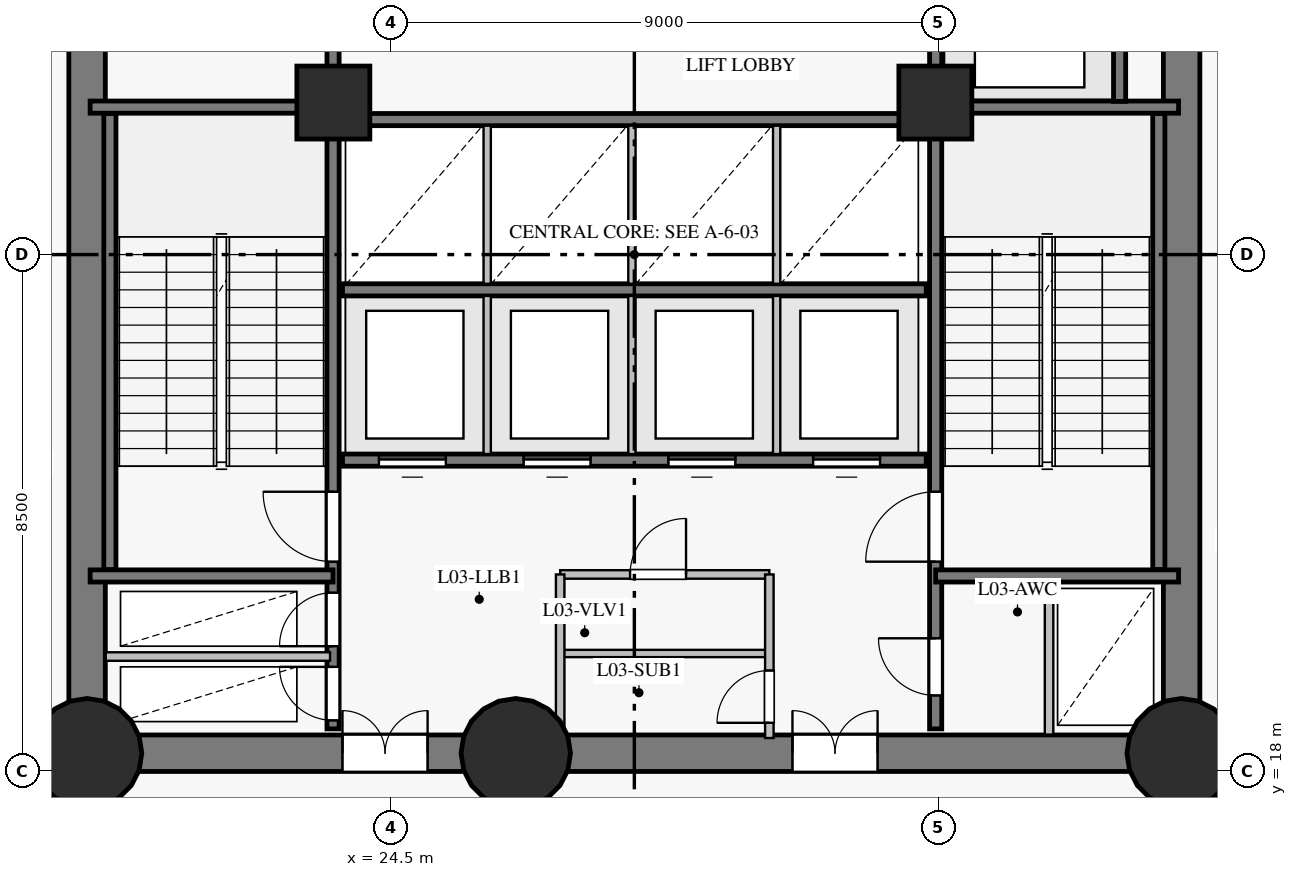
"""IFC4 building model, lengths in metres.
Left out: names, types, materials, properties, quantities, classifications, styles, units other than length and angle.
Written with IfcOpenShell. Run it as: python <this file> out.ifc"""

import sys

from ifc_helpers import new_model, si_unit, direction, frame, frame_2d, origin, origin_with_axes, origin_2d, place, context, subcontext, project, spatial, rectangle, circle, extrude, source, transform, mapped, element, fill, save


model = new_model("IFC4")
c1 = context("Model", 3, precision=1e-05, world=origin(), true_north=direction((0.0, 1.0)))
c2 = subcontext(c1, "Body", "Model", "MODEL_VIEW")
j1 = project(units=[si_unit("LENGTHUNIT", "METRE"), si_unit("PLANEANGLEUNIT", "RADIAN")], contexts=[c1])
p1 = place(None, origin())
s1 = spatial("IfcSite", under=j1, at=p1, CompositionType="ELEMENT")
p2 = place(p1, origin())
s2 = spatial("IfcBuilding", under=s1, at=p2, CompositionType="ELEMENT")
p3 = place(p2, frame((0.0, 0.0, 13.5)))
s3 = spatial("IfcBuildingStorey", under=s2, at=p3, CompositionType="ELEMENT", Elevation=13.5)
p4 = place(p3, frame((19.5, 18.3, 0.0), z_axis=(0.0, 0.0, 1.0), x_axis=(1.0, 0.0, 0.0)))
e1 = element("IfcWall", 1, at=p4, inside=s3, PredefinedType="SHEAR", context=c2, shape_type="SweptSolid", body=[
    extrude(rectangle(XDim=7.05, YDim=0.6, at=frame_2d((3.525, 0.0))), origin(), (0.0, 0.0, 1.0), 4.225),
])
p5 = place(p4, frame((4.2, 0.0, 0.0)))
e2 = element("IfcOpeningElement", 2, at=p5, cuts=e1, PredefinedType="OPENING", context=c2, shape_type="SweptSolid", body=[
    extrude(rectangle(XDim=1.4, YDim=2.2, at=frame_2d((0.7, 1.1))), frame((0.0, 0.31, 0.0), z_axis=(0.0, -1.0, 0.0), x_axis=(1.0, 0.0, 0.0)), (0.0, 0.0, 1.0), 0.62),
])
p6 = place(p3, frame((26.55, 18.3, 0.0), z_axis=(0.0, 0.0, 1.0), x_axis=(1.0, 0.0, 0.0)))
e3 = element("IfcWall", 3, at=p6, inside=s3, PredefinedType="SHEAR", context=c2, shape_type="SweptSolid", body=[
    extrude(rectangle(XDim=10.95, YDim=0.6, at=frame_2d((5.475, 0.0))), origin(), (0.0, 0.0, 1.0), 4.225),
])
p7 = place(p6, frame((4.55, 0.0, 0.0)))
e4 = element("IfcOpeningElement", 4, at=p7, cuts=e3, PredefinedType="OPENING", context=c2, shape_type="SweptSolid", body=[
    extrude(rectangle(XDim=1.4, YDim=2.2, at=frame_2d((0.7, 1.1))), frame((0.0, 0.31, 0.0), z_axis=(0.0, -1.0, 0.0), x_axis=(1.0, 0.0, 0.0)), (0.0, 0.0, 1.0), 0.62),
])
p8 = place(p3, frame((37.5, 18.3, 0.0), z_axis=(0.0, 0.0, 1.0), x_axis=(0.0, 1.0, 0.0)))
e5 = element("IfcWall", 5, at=p8, inside=s3, PredefinedType="SHEAR", context=c2, shape_type="SweptSolid", body=[
    extrude(rectangle(XDim=16.4, YDim=0.6, at=frame_2d((8.2, 0.0))), origin(), (0.0, 0.0, 1.0), 4.225),
])
p9 = place(p8, frame((13.96, 0.0, 0.0)))
e6 = element("IfcOpeningElement", 6, at=p9, cuts=e5, PredefinedType="OPENING", context=c2, shape_type="SweptSolid", body=[
    extrude(rectangle(XDim=1.2, YDim=2.15, at=frame_2d((0.6, 1.075))), frame((0.0, 0.31, 0.0), z_axis=(0.0, -1.0, 0.0), x_axis=(1.0, 0.0, 0.0)), (0.0, 0.0, 1.0), 0.62),
])
p10 = place(p3, frame((19.5, 34.7, 0.0), z_axis=(0.0, 0.0, 1.0), x_axis=(0.0, -1.0, 0.0)))
e7 = element("IfcWall", 7, at=p10, inside=s3, PredefinedType="SHEAR", context=c2, shape_type="SweptSolid", body=[
    extrude(rectangle(XDim=16.4, YDim=0.6, at=frame_2d((8.2, 0.0))), origin(), (0.0, 0.0, 1.0), 4.225),
])
p11 = place(p10, frame((3.1, 0.0, 0.0)))
e8 = element("IfcOpeningElement", 8, at=p11, cuts=e7, PredefinedType="OPENING", context=c2, shape_type="SweptSolid", body=[
    extrude(rectangle(XDim=1.1, YDim=2.15, at=frame_2d((0.55, 1.075))), frame((0.0, 0.31, 0.0), z_axis=(0.0, -1.0, 0.0), x_axis=(1.0, 0.0, 0.0)), (0.0, 0.0, 1.0), 0.62),
])
m1 = source(origin_with_axes(), c2, "Body", "SweptSolid", [
    extrude(circle(Radius=0.9, at=origin_2d()), origin(), (0.0, 0.0, 1.0), 4.5),
])
for number, where, z_axis, x_axis in (
    (9, (19.5, 18.3, 0.0), (0.0, 0.0, 1.0), (1.0, 0.0, 0.0)),
    (10, (26.55, 18.3, 0.0), (0.0, 0.0, 1.0), (1.0, 0.0, 0.0)),
    (11, (37.5, 18.3, 0.0), (0.0, 0.0, 1.0), (1.0, 0.0, 0.0)),
):
    element("IfcColumn", number, at=place(p3, frame(where, z_axis=z_axis, x_axis=x_axis)), inside=s3, PredefinedType="COLUMN", context=c2, shape_type="MappedRepresentation", body=[
        mapped(m1, transform((0.0, 0.0, 0.0), scale=1.0)),
    ])
m2 = source(origin_with_axes(), c2, "Body", "SweptSolid", [
    extrude(rectangle(XDim=1.2, YDim=1.2, at=origin_2d()), origin(), (0.0, 0.0, 1.0), 4.5),
])
for number, where, z_axis, x_axis in (
    (12, (23.55, 29.0, 0.0), (0.0, 0.0, 1.0), (1.0, 0.0, 0.0)),
    (13, (33.45, 29.0, 0.0), (0.0, 0.0, 1.0), (1.0, 0.0, 0.0)),
):
    element("IfcColumn", number, at=place(p3, frame(where, z_axis=z_axis, x_axis=x_axis)), inside=s3, PredefinedType="COLUMN", context=c2, shape_type="MappedRepresentation", body=[
        mapped(m2, transform((0.0, 0.0, 0.0), scale=1.0)),
    ])
p12 = place(p3, frame((23.545, 18.7, 0.0), z_axis=(0.0, 0.0, 1.0), x_axis=(0.0, 1.0, 0.0)))
e14 = element("IfcWall", 14, at=p12, inside=s3, PredefinedType="SHEAR", context=c2, shape_type="SweptSolid", body=[
    extrude(rectangle(XDim=15.6, YDim=0.2, at=frame_2d((7.8, 0.0))), origin(), (0.0, 0.0, 1.0), 4.225),
])
p13 = place(p12, frame((2.75, 0.0, 0.0)))
e15 = element("IfcOpeningElement", 15, at=p13, cuts=e14, PredefinedType="OPENING", context=c2, shape_type="SweptSolid", body=[
    extrude(rectangle(XDim=1.15, YDim=2.15, at=frame_2d((0.575, 1.075))), frame((0.0, 0.11, 0.0), z_axis=(0.0, -1.0, 0.0), x_axis=(1.0, 0.0, 0.0)), (0.0, 0.0, 1.0), 0.22),
])
p14 = place(p12, frame((0.14, 0.0, 0.0)))
e16 = element("IfcOpeningElement", 16, at=p14, cuts=e14, PredefinedType="OPENING", context=c2, shape_type="SweptSolid", body=[
    extrude(rectangle(XDim=0.88, YDim=2.1, at=frame_2d((0.44, 1.05))), frame((0.0, 0.11, 0.0), z_axis=(0.0, -1.0, 0.0), x_axis=(1.0, 0.0, 0.0)), (0.0, 0.0, 1.0), 0.22),
])
p15 = place(p12, frame((1.36, 0.0, 0.0)))
e17 = element("IfcOpeningElement", 17, at=p15, cuts=e14, PredefinedType="OPENING", context=c2, shape_type="SweptSolid", body=[
    extrude(rectangle(XDim=0.88, YDim=2.1, at=frame_2d((0.44, 1.05))), frame((0.0, 0.11, 0.0), z_axis=(0.0, -1.0, 0.0), x_axis=(1.0, 0.0, 0.0)), (0.0, 0.0, 1.0), 0.22),
])
p16 = place(p12, frame((12.1, 0.0, 0.0)))
e18 = element("IfcOpeningElement", 18, at=p16, cuts=e14, PredefinedType="OPENING", context=c2, shape_type="SweptSolid", body=[
    extrude(rectangle(XDim=1.12, YDim=2.15, at=frame_2d((0.56, 1.075))), frame((0.0, 0.11, 0.0), z_axis=(0.0, -1.0, 0.0), x_axis=(1.0, 0.0, 0.0)), (0.0, 0.0, 1.0), 0.22),
])
p17 = place(p12, frame((14.05, 0.0, 0.0)))
e19 = element("IfcOpeningElement", 19, at=p17, cuts=e14, PredefinedType="OPENING", context=c2, shape_type="SweptSolid", body=[
    extrude(rectangle(XDim=1.12, YDim=2.15, at=frame_2d((0.56, 1.075))), frame((0.0, 0.11, 0.0), z_axis=(0.0, -1.0, 0.0), x_axis=(1.0, 0.0, 0.0)), (0.0, 0.0, 1.0), 0.22),
])
p18 = place(p3, frame((33.455, 18.7, 0.0), z_axis=(0.0, 0.0, 1.0), x_axis=(0.0, 1.0, 0.0)))
e20 = element("IfcWall", 20, at=p18, inside=s3, PredefinedType="SHEAR", context=c2, shape_type="SweptSolid", body=[
    extrude(rectangle(XDim=15.6, YDim=0.2, at=frame_2d((7.8, 0.0))), origin(), (0.0, 0.0, 1.0), 4.225),
])
p19 = place(p18, frame((2.75, 0.0, 0.0)))
e21 = element("IfcOpeningElement", 21, at=p19, cuts=e20, PredefinedType="OPENING", context=c2, shape_type="SweptSolid", body=[
    extrude(rectangle(XDim=1.15, YDim=2.15, at=frame_2d((0.575, 1.075))), frame((0.0, 0.11, 0.0), z_axis=(0.0, -1.0, 0.0), x_axis=(1.0, 0.0, 0.0)), (0.0, 0.0, 1.0), 0.22),
])
p20 = place(p18, frame((0.55, 0.0, 0.0)))
e22 = element("IfcOpeningElement", 22, at=p20, cuts=e20, PredefinedType="OPENING", context=c2, shape_type="SweptSolid", body=[
    extrude(rectangle(XDim=0.94, YDim=2.1, at=frame_2d((0.47, 1.05))), frame((0.0, 0.11, 0.0), z_axis=(0.0, -1.0, 0.0), x_axis=(1.0, 0.0, 0.0)), (0.0, 0.0, 1.0), 0.22),
])
p21 = place(p3, frame((23.7, 23.12, 0.0), z_axis=(0.0, 0.0, 1.0), x_axis=(1.0, 0.0, 0.0)))
e23 = element("IfcWall", 23, at=p21, inside=s3, PredefinedType="SHEAR", context=c2, shape_type="SweptSolid", body=[
    extrude(rectangle(XDim=9.6, YDim=0.2, at=frame_2d((4.8, 0.0))), origin(), (0.0, 0.0, 1.0), 4.225),
])
p22 = place(p21, frame((0.6, 0.0, 0.0)))
e24 = element("IfcOpeningElement", 24, at=p22, cuts=e23, PredefinedType="OPENING", context=c2, shape_type="SweptSolid", body=[
    extrude(rectangle(XDim=1.1, YDim=2.15, at=frame_2d((0.55, 1.075))), frame((0.0, 0.11, 0.0), z_axis=(0.0, -1.0, 0.0), x_axis=(1.0, 0.0, 0.0)), (0.0, 0.0, 1.0), 0.22),
])
p23 = place(p21, frame((2.98, 0.0, 0.0)))
e25 = element("IfcOpeningElement", 25, at=p23, cuts=e23, PredefinedType="OPENING", context=c2, shape_type="SweptSolid", body=[
    extrude(rectangle(XDim=1.1, YDim=2.15, at=frame_2d((0.55, 1.075))), frame((0.0, 0.11, 0.0), z_axis=(0.0, -1.0, 0.0), x_axis=(1.0, 0.0, 0.0)), (0.0, 0.0, 1.0), 0.22),
])
p24 = place(p21, frame((5.36, 0.0, 0.0)))
e26 = element("IfcOpeningElement", 26, at=p24, cuts=e23, PredefinedType="OPENING", context=c2, shape_type="SweptSolid", body=[
    extrude(rectangle(XDim=1.1, YDim=2.15, at=frame_2d((0.55, 1.075))), frame((0.0, 0.11, 0.0), z_axis=(0.0, -1.0, 0.0), x_axis=(1.0, 0.0, 0.0)), (0.0, 0.0, 1.0), 0.22),
])
p25 = place(p21, frame((7.74, 0.0, 0.0)))
e27 = element("IfcOpeningElement", 27, at=p25, cuts=e23, PredefinedType="OPENING", context=c2, shape_type="SweptSolid", body=[
    extrude(rectangle(XDim=1.1, YDim=2.15, at=frame_2d((0.55, 1.075))), frame((0.0, 0.11, 0.0), z_axis=(0.0, -1.0, 0.0), x_axis=(1.0, 0.0, 0.0)), (0.0, 0.0, 1.0), 0.22),
])
for number, where, z_axis, x_axis in (
    (28, (23.7, 25.92, 0.0), (0.0, 0.0, 1.0), (1.0, 0.0, 0.0)),
    (29, (23.7, 28.72, 0.0), (0.0, 0.0, 1.0), (1.0, 0.0, 0.0)),
):
    element("IfcWall", number, at=place(p3, frame(where, z_axis=z_axis, x_axis=x_axis)), inside=s3, PredefinedType="SHEAR", context=c2, shape_type="SweptSolid", body=[
        extrude(rectangle(XDim=9.6, YDim=0.2, at=frame_2d((4.8, 0.0))), origin(), (0.0, 0.0, 1.0), 4.225),
    ])
for number, where, z_axis, x_axis in (
    (30, (19.875, 21.32, 0.0), (0.0, 0.0, 1.0), (0.0, 1.0, 0.0)),
    (31, (37.125, 21.32, 0.0), (0.0, 0.0, 1.0), (0.0, 1.0, 0.0)),
):
    element("IfcWall", number, at=place(p3, frame(where, z_axis=z_axis, x_axis=x_axis)), inside=s3, PredefinedType="SHEAR", context=c2, shape_type="SweptSolid", body=[
        extrude(rectangle(XDim=7.5, YDim=0.2, at=frame_2d((3.75, 0.0))), origin(), (0.0, 0.0, 1.0), 4.225),
    ])
for number, where, z_axis, x_axis in (
    (32, (33.455, 21.215, 0.0), (0.0, 0.0, 1.0), (1.0, 0.0, 0.0)),
    (33, (33.455, 28.925, 0.0), (0.0, 0.0, 1.0), (1.0, 0.0, 0.0)),
    (34, (19.55, 21.215, 0.0), (0.0, 0.0, 1.0), (1.0, 0.0, 0.0)),
    (35, (19.55, 28.925, 0.0), (0.0, 0.0, 1.0), (1.0, 0.0, 0.0)),
):
    element("IfcWall", number, at=place(p3, frame(where, z_axis=z_axis, x_axis=x_axis)), inside=s3, PredefinedType="SHEAR", context=c2, shape_type="SweptSolid", body=[
        extrude(rectangle(XDim=3.995, YDim=0.2, at=frame_2d((1.998, 0.0))), origin(), (0.0, 0.0, 1.0), 4.225),
    ])
p26 = place(p3, frame((36.48, 29.02, 0.0), z_axis=(0.0, 0.0, 1.0), x_axis=(0.0, 1.0, 0.0)))
e36 = element("IfcWall", 36, at=p26, inside=s3, PredefinedType="SHEAR", context=c2, shape_type="SweptSolid", body=[
    extrude(rectangle(XDim=2.86, YDim=0.2, at=frame_2d((1.43, 0.0))), origin(), (0.0, 0.0, 1.0), 4.225),
])
p27 = place(p3, frame((19.807, 19.89, 0.0), z_axis=(0.0, 0.0, 1.0), x_axis=(1.0, 0.0, 0.0)))
e37 = element("IfcWall", 37, at=p27, inside=s3, PredefinedType="PARTITIONING", context=c2, shape_type="SweptSolid", body=[
    extrude(rectangle(XDim=3.689, YDim=0.14, at=frame_2d((1.844, 0.0))), origin(), (0.0, 0.0, 1.0), 4.225),
])
p28 = place(p3, frame((27.28, 21.24, 0.0), z_axis=(0.0, 0.0, 1.0), x_axis=(1.0, 0.0, 0.0)))
e38 = element("IfcWall", 38, at=p28, inside=s3, PredefinedType="PARTITIONING", context=c2, shape_type="SweptSolid", body=[
    extrude(rectangle(XDim=3.44, YDim=0.14, at=frame_2d((1.72, 0.0))), origin(), (0.0, 0.0, 1.0), 4.225),
])
p29 = place(p28, frame((1.15, 0.0, 0.0)))
e39 = element("IfcOpeningElement", 39, at=p29, cuts=e38, PredefinedType="OPENING", context=c2, shape_type="SweptSolid", body=[
    extrude(rectangle(XDim=0.92, YDim=2.1, at=frame_2d((0.46, 1.05))), frame((0.0, 0.08, 0.0), z_axis=(0.0, -1.0, 0.0), x_axis=(1.0, 0.0, 0.0)), (0.0, 0.0, 1.0), 0.16),
])
p30 = place(p3, frame((27.28, 19.94, 0.0), z_axis=(0.0, 0.0, 1.0), x_axis=(1.0, 0.0, 0.0)))
e40 = element("IfcWall", 40, at=p30, inside=s3, PredefinedType="PARTITIONING", context=c2, shape_type="SweptSolid", body=[
    extrude(rectangle(XDim=3.44, YDim=0.12, at=frame_2d((1.72, 0.0))), origin(), (0.0, 0.0, 1.0), 4.225),
])
p31 = place(p3, frame((27.28, 18.55, 0.0), z_axis=(0.0, 0.0, 1.0), x_axis=(0.0, 1.0, 0.0)))
e41 = element("IfcWall", 41, at=p31, inside=s3, PredefinedType="PARTITIONING", context=c2, shape_type="SweptSolid", body=[
    extrude(rectangle(XDim=2.69, YDim=0.14, at=frame_2d((1.345, 0.0))), origin(), (0.0, 0.0, 1.0), 4.225),
])
p32 = place(p3, frame((30.72, 18.55, 0.0), z_axis=(0.0, 0.0, 1.0), x_axis=(0.0, 1.0, 0.0)))
e42 = element("IfcWall", 42, at=p32, inside=s3, PredefinedType="PARTITIONING", context=c2, shape_type="SweptSolid", body=[
    extrude(rectangle(XDim=2.69, YDim=0.14, at=frame_2d((1.345, 0.0))), origin(), (0.0, 0.0, 1.0), 4.225),
])
p33 = place(p32, frame((0.25, 0.0, 0.0)))
e43 = element("IfcOpeningElement", 43, at=p33, cuts=e42, PredefinedType="OPENING", context=c2, shape_type="SweptSolid", body=[
    extrude(rectangle(XDim=0.86, YDim=2.1, at=frame_2d((0.43, 1.05))), frame((0.0, 0.08, 0.0), z_axis=(0.0, -1.0, 0.0), x_axis=(1.0, 0.0, 0.0)), (0.0, 0.0, 1.0), 0.16),
])
for number, where, z_axis, x_axis in (
    (44, (26.08, 23.22, 0.0), (0.0, 0.0, 1.0), (0.0, 1.0, 0.0)),
    (45, (28.46, 23.22, 0.0), (0.0, 0.0, 1.0), (0.0, 1.0, 0.0)),
    (46, (30.84, 23.22, 0.0), (0.0, 0.0, 1.0), (0.0, 1.0, 0.0)),
    (47, (26.08, 26.02, 0.0), (0.0, 0.0, 1.0), (0.0, 1.0, 0.0)),
    (48, (28.46, 26.02, 0.0), (0.0, 0.0, 1.0), (0.0, 1.0, 0.0)),
    (49, (30.84, 26.02, 0.0), (0.0, 0.0, 1.0), (0.0, 1.0, 0.0)),
):
    element("IfcWall", number, at=place(p3, frame(where, z_axis=z_axis, x_axis=x_axis)), inside=s3, PredefinedType="PARTITIONING", context=c2, shape_type="SweptSolid", body=[
        extrude(rectangle(XDim=2.6, YDim=0.12, at=frame_2d((1.3, 0.0))), origin(), (0.0, 0.0, 1.0), 4.225),
    ])
p34 = place(p3, frame((35.32, 18.607, 0.0), z_axis=(0.0, 0.0, 1.0), x_axis=(0.0, 1.0, 0.0)))
e50 = element("IfcWall", 50, at=p34, inside=s3, PredefinedType="PARTITIONING", context=c2, shape_type="SweptSolid", body=[
    extrude(rectangle(XDim=2.503, YDim=0.14, at=frame_2d((1.251, 0.0))), origin(), (0.0, 0.0, 1.0), 4.225),
])
m3 = source(origin_with_axes(), c2, "Body", "SweptSolid", [
    extrude(rectangle(XDim=1.15, YDim=2.15, at=frame_2d((0.575, 1.075))), frame((0.0, 0.025, 0.0), z_axis=(0.0, -1.0, 0.0), x_axis=(1.0, 0.0, 0.0)), (0.0, 0.0, 1.0), 0.05),
])
p35 = place(p13, origin())
e51 = element("IfcDoor", 51, at=p35, inside=s3, OperationType="SINGLE_SWING_RIGHT", PredefinedType="DOOR", context=c2, shape_type="MappedRepresentation", body=[
    mapped(m3, transform((0.0, 0.0, 0.0), scale=1.0)),
])
fill(e15, e51)
p36 = place(p19, origin())
e52 = element("IfcDoor", 52, at=p36, inside=s3, OperationType="SINGLE_SWING_LEFT", PredefinedType="DOOR", context=c2, shape_type="MappedRepresentation", body=[
    mapped(m3, transform((0.0, 0.0, 0.0), scale=1.0)),
])
fill(e21, e52)
m4 = source(origin_with_axes(), c2, "Body", "SweptSolid", [
    extrude(rectangle(XDim=0.88, YDim=2.1, at=frame_2d((0.44, 1.05))), frame((0.0, 0.025, 0.0), z_axis=(0.0, -1.0, 0.0), x_axis=(1.0, 0.0, 0.0)), (0.0, 0.0, 1.0), 0.05),
])
p37 = place(p14, origin())
e53 = element("IfcDoor", 53, at=p37, inside=s3, OperationType="SINGLE_SWING_RIGHT", PredefinedType="DOOR", context=c2, shape_type="MappedRepresentation", body=[
    mapped(m4, transform((0.0, 0.0, 0.0), scale=1.0)),
])
fill(e16, e53)
p38 = place(p15, origin())
e54 = element("IfcDoor", 54, at=p38, inside=s3, OperationType="SINGLE_SWING_LEFT", PredefinedType="DOOR", context=c2, shape_type="MappedRepresentation", body=[
    mapped(m4, transform((0.0, 0.0, 0.0), scale=1.0)),
])
fill(e17, e54)
m5 = source(origin_with_axes(), c2, "Body", "SweptSolid", [
    extrude(rectangle(XDim=1.4, YDim=2.2, at=frame_2d((0.7, 1.1))), frame((0.0, 0.025, 0.0), z_axis=(0.0, -1.0, 0.0), x_axis=(1.0, 0.0, 0.0)), (0.0, 0.0, 1.0), 0.05),
])
p39 = place(p5, origin())
e55 = element("IfcDoor", 55, at=p39, inside=s3, OperationType="DOUBLE_DOOR_SINGLE_SWING", PredefinedType="DOOR", context=c2, shape_type="MappedRepresentation", body=[
    mapped(m5, transform((0.0, 0.0, 0.0), scale=1.0)),
])
fill(e2, e55)
p40 = place(p7, origin())
e56 = element("IfcDoor", 56, at=p40, inside=s3, OperationType="DOUBLE_DOOR_SINGLE_SWING", PredefinedType="DOOR", context=c2, shape_type="MappedRepresentation", body=[
    mapped(m5, transform((0.0, 0.0, 0.0), scale=1.0)),
])
fill(e4, e56)
m6 = source(origin_with_axes(), c2, "Body", "SweptSolid", [
    extrude(rectangle(XDim=0.94, YDim=2.1, at=frame_2d((0.47, 1.05))), frame((0.0, 0.025, 0.0), z_axis=(0.0, -1.0, 0.0), x_axis=(1.0, 0.0, 0.0)), (0.0, 0.0, 1.0), 0.05),
])
p41 = place(p20, origin())
e57 = element("IfcDoor", 57, at=p41, inside=s3, OperationType="SINGLE_SWING_RIGHT", PredefinedType="DOOR", context=c2, shape_type="MappedRepresentation", body=[
    mapped(m6, transform((0.0, 0.0, 0.0), scale=1.0)),
])
fill(e22, e57)
m7 = source(origin_with_axes(), c2, "Body", "SweptSolid", [
    extrude(rectangle(XDim=0.86, YDim=2.1, at=frame_2d((0.43, 1.05))), frame((0.0, 0.025, 0.0), z_axis=(0.0, -1.0, 0.0), x_axis=(1.0, 0.0, 0.0)), (0.0, 0.0, 1.0), 0.05),
])
p42 = place(p33, origin())
e58 = element("IfcDoor", 58, at=p42, inside=s3, OperationType="SINGLE_SWING_LEFT", PredefinedType="DOOR", context=c2, shape_type="MappedRepresentation", body=[
    mapped(m7, transform((0.0, 0.0, 0.0), scale=1.0)),
])
fill(e43, e58)
m8 = source(origin_with_axes(), c2, "Body", "SweptSolid", [
    extrude(rectangle(XDim=0.92, YDim=2.1, at=frame_2d((0.46, 1.05))), frame((0.0, 0.025, 0.0), z_axis=(0.0, -1.0, 0.0), x_axis=(1.0, 0.0, 0.0)), (0.0, 0.0, 1.0), 0.05),
])
p43 = place(p29, origin())
e59 = element("IfcDoor", 59, at=p43, inside=s3, OperationType="SINGLE_SWING_RIGHT", PredefinedType="DOOR", context=c2, shape_type="MappedRepresentation", body=[
    mapped(m8, transform((0.0, 0.0, 0.0), scale=1.0)),
])
fill(e39, e59)
m9 = source(origin_with_axes(), c2, "Body", "SweptSolid", [
    extrude(rectangle(XDim=1.1, YDim=2.15, at=frame_2d((0.55, 1.075))), frame((0.0, 0.025, 0.0), z_axis=(0.0, -1.0, 0.0), x_axis=(1.0, 0.0, 0.0)), (0.0, 0.0, 1.0), 0.05),
])
p44 = place(p22, origin())
e60 = element("IfcDoor", 60, at=p44, inside=s3, OperationType="SLIDING_TO_LEFT", PredefinedType="DOOR", context=c2, shape_type="MappedRepresentation", body=[
    mapped(m9, transform((0.0, 0.0, 0.0), scale=1.0)),
])
fill(e24, e60)
p45 = place(p23, origin())
e61 = element("IfcDoor", 61, at=p45, inside=s3, OperationType="SLIDING_TO_RIGHT", PredefinedType="DOOR", context=c2, shape_type="MappedRepresentation", body=[
    mapped(m9, transform((0.0, 0.0, 0.0), scale=1.0)),
])
fill(e25, e61)
p46 = place(p24, origin())
e62 = element("IfcDoor", 62, at=p46, inside=s3, OperationType="SLIDING_TO_LEFT", PredefinedType="DOOR", context=c2, shape_type="MappedRepresentation", body=[
    mapped(m9, transform((0.0, 0.0, 0.0), scale=1.0)),
])
fill(e26, e62)
p47 = place(p25, origin())
e63 = element("IfcDoor", 63, at=p47, inside=s3, OperationType="SLIDING_TO_RIGHT", PredefinedType="DOOR", context=c2, shape_type="MappedRepresentation", body=[
    mapped(m9, transform((0.0, 0.0, 0.0), scale=1.0)),
])
fill(e27, e63)
save(model, sys.argv[1])
